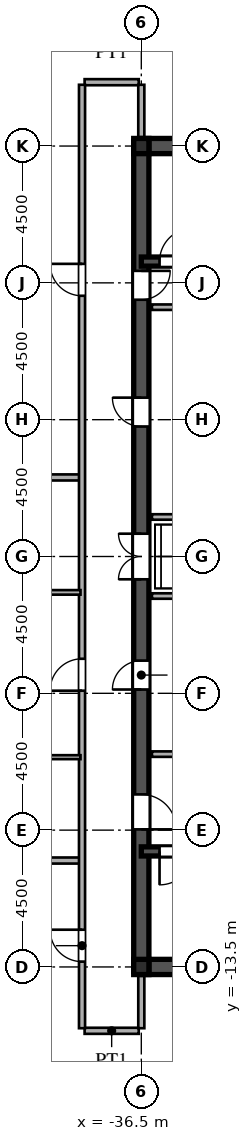
"""IFC4 building model, lengths in metres.
Left out: names, types, materials, properties, quantities, classifications, styles, units other than length and angle.
Written with IfcOpenShell. Run it as: python <this file> out.ifc"""

import sys

from ifc_helpers import new_model, si_unit, direction, frame, frame_2d, origin, origin_2d, place, context, subcontext, project, spatial, rectangle, i_section, extrude, source, transform, mapped, element, fill, save


model = new_model("IFC4")
c1 = context("Model", 3, precision=1e-05, world=origin(), true_north=direction((0.0, 1.0)))
c2 = subcontext(c1, "Body", "Model", "MODEL_VIEW")
j1 = project(units=[si_unit("LENGTHUNIT", "METRE"), si_unit("PLANEANGLEUNIT", "RADIAN")], contexts=[c1])
p1 = place(None, origin())
s1 = spatial("IfcSite", under=j1, at=p1, CompositionType="ELEMENT")
p2 = place(p1, origin())
s2 = spatial("IfcBuilding", under=s1, at=p2, CompositionType="ELEMENT")
p3 = place(p2, frame((0.0, 0.0, 234.6)))
s3 = spatial("IfcBuildingStorey", under=s2, at=p3, CompositionType="ELEMENT", Elevation=234.6)
m1 = source(origin(), c2, "Body", "SweptSolid", [
    extrude(i_section(OverallWidth=0.5, OverallDepth=0.5, WebThickness=0.02, FlangeThickness=0.032, at=origin_2d()), origin(), (0.0, 0.0, 1.0), 4.8),
])
for number, where, z_axis, x_axis in (
    (1, (-36.5, -13.5, 0.0), (0.0, 0.0, 1.0), (1.0, 0.0, 0.0)),
    (2, (-36.5, 13.5, 0.0), (0.0, 0.0, 1.0), (1.0, 0.0, 0.0)),
):
    element("IfcColumn", number, at=place(p3, frame(where, z_axis=z_axis, x_axis=x_axis)), inside=s3, PredefinedType="COLUMN", context=c2, shape_type="MappedRepresentation", body=[
        mapped(m1, transform((0.0, 0.0, 0.0), scale=1.0)),
    ])
for number, where, z_axis, x_axis in (
    (3, (-36.5, -13.5, 0.0), (0.0, 0.0, 1.0), (1.0, 0.0, 0.0)),
    (4, (-36.5, 13.5, 0.0), (0.0, 0.0, 1.0), (1.0, 0.0, 0.0)),
):
    element("IfcWall", number, at=place(p3, frame(where, z_axis=z_axis, x_axis=x_axis)), inside=s3, PredefinedType="SHEAR", context=c2, shape_type="SweptSolid", body=[
        extrude(rectangle(XDim=9.0, YDim=0.5, at=frame_2d((4.5, 0.0))), origin(), (0.0, 0.0, 1.0), 4.58),
    ])
p4 = place(p3, frame((-36.5, -13.65, 0.0), z_axis=(0.0, 0.0, 1.0), x_axis=(0.0, 1.0, 0.0)))
e5 = element("IfcWall", 5, at=p4, inside=s3, PredefinedType="SHEAR", context=c2, shape_type="SweptSolid", body=[
    extrude(rectangle(XDim=7.15, YDim=0.5, at=frame_2d((3.575, 0.0))), origin(), (0.0, 0.0, 1.0), 4.58),
])
p5 = place(p4, frame((4.675, 0.0, 0.0)))
e6 = element("IfcOpeningElement", 6, at=p5, cuts=e5, PredefinedType="OPENING", context=c2, shape_type="SweptSolid", body=[
    extrude(rectangle(XDim=1.15, YDim=2.2, at=frame_2d((0.575, 1.1))), frame((0.0, 0.26, 0.0), z_axis=(0.0, -1.0, 0.0), x_axis=(1.0, 0.0, 0.0)), (0.0, 0.0, 1.0), 0.52),
])
p6 = place(p3, frame((-36.5, -1.3, 0.0), z_axis=(0.0, 0.0, 1.0), x_axis=(0.0, 1.0, 0.0)))
e7 = element("IfcWall", 7, at=p6, inside=s3, PredefinedType="SHEAR", context=c2, shape_type="SweptSolid", body=[
    extrude(rectangle(XDim=2.6, YDim=0.5, at=frame_2d((1.3, 0.0))), origin(), (0.0, 0.0, 1.0), 4.58),
])
p7 = place(p6, frame((0.55, 0.0, 0.0)))
e8 = element("IfcOpeningElement", 8, at=p7, cuts=e7, PredefinedType="OPENING", context=c2, shape_type="SweptSolid", body=[
    extrude(rectangle(XDim=1.5, YDim=2.3, at=frame_2d((0.75, 1.15))), frame((0.0, 0.26, 0.0), z_axis=(0.0, -1.0, 0.0), x_axis=(1.0, 0.0, 0.0)), (0.0, 0.0, 1.0), 0.52),
])
p8 = place(p3, frame((-36.5, 8.2, 0.0), z_axis=(0.0, 0.0, 1.0), x_axis=(0.0, 1.0, 0.0)))
e9 = element("IfcWall", 9, at=p8, inside=s3, PredefinedType="SHEAR", context=c2, shape_type="SweptSolid", body=[
    extrude(rectangle(XDim=5.45, YDim=0.5, at=frame_2d((2.725, 0.0))), origin(), (0.0, 0.0, 1.0), 4.58),
])
p9 = place(p8, frame((0.245, 0.0, 0.0)))
e10 = element("IfcOpeningElement", 10, at=p9, cuts=e9, PredefinedType="OPENING", context=c2, shape_type="SweptSolid", body=[
    extrude(rectangle(XDim=0.95, YDim=2.15, at=frame_2d((0.475, 1.075))), frame((0.0, 0.26, 0.0), z_axis=(0.0, -1.0, 0.0), x_axis=(1.0, 0.0, 0.0)), (0.0, 0.0, 1.0), 0.52),
])
p10 = place(p3, frame((-36.5, -6.5, 0.0), z_axis=(0.0, 0.0, 1.0), x_axis=(0.0, 1.0, 0.0)))
e11 = element("IfcWall", 11, at=p10, inside=s3, PredefinedType="SHEAR", context=c2, shape_type="SweptSolid", body=[
    extrude(rectangle(XDim=5.2, YDim=0.5, at=frame_2d((2.6, 0.0))), origin(), (0.0, 0.0, 1.0), 4.58),
])
p11 = place(p10, frame((2.125, 0.0, 0.0)))
e12 = element("IfcOpeningElement", 12, at=p11, cuts=e11, PredefinedType="OPENING", context=c2, shape_type="SweptSolid", body=[
    extrude(rectangle(XDim=0.95, YDim=2.15, at=frame_2d((0.475, 1.075))), frame((0.0, 0.26, 0.0), z_axis=(0.0, -1.0, 0.0), x_axis=(1.0, 0.0, 0.0)), (0.0, 0.0, 1.0), 0.52),
])
p12 = place(p3, frame((-36.5, 1.3, 0.0), z_axis=(0.0, 0.0, 1.0), x_axis=(0.0, 1.0, 0.0)))
e13 = element("IfcWall", 13, at=p12, inside=s3, PredefinedType="SHEAR", context=c2, shape_type="SweptSolid", body=[
    extrude(rectangle(XDim=6.9, YDim=0.5, at=frame_2d((3.45, 0.0))), origin(), (0.0, 0.0, 1.0), 4.58),
])
p13 = place(p12, frame((2.975, 0.0, 0.0)))
e14 = element("IfcOpeningElement", 14, at=p13, cuts=e13, PredefinedType="OPENING", context=c2, shape_type="SweptSolid", body=[
    extrude(rectangle(XDim=0.95, YDim=2.15, at=frame_2d((0.475, 1.075))), frame((0.0, 0.26, 0.0), z_axis=(0.0, -1.0, 0.0), x_axis=(1.0, 0.0, 0.0)), (0.0, 0.0, 1.0), 0.52),
])
p14 = place(p3, frame((-36.5, -9.7, 0.0), z_axis=(0.0, 0.0, 1.0), x_axis=(1.0, 0.0, 0.0)))
e15 = element("IfcWall", 15, at=p14, inside=s3, PredefinedType="SHEAR", context=c2, shape_type="SweptSolid", body=[
    extrude(rectangle(XDim=9.0, YDim=0.3, at=frame_2d((4.5, 0.0))), origin(), (0.0, 0.0, 1.0), 4.58),
])
p15 = place(p14, frame((0.6, 0.0, 0.0)))
e16 = element("IfcOpeningElement", 16, at=p15, cuts=e15, PredefinedType="OPENING", context=c2, shape_type="SweptSolid", body=[
    extrude(rectangle(XDim=1.1, YDim=2.2, at=frame_2d((0.55, 1.1))), frame((0.0, 0.16, 0.0), z_axis=(0.0, -1.0, 0.0), x_axis=(1.0, 0.0, 0.0)), (0.0, 0.0, 1.0), 0.32),
])
p16 = place(p3, frame((-36.5, 9.7, 0.0), z_axis=(0.0, 0.0, 1.0), x_axis=(1.0, 0.0, 0.0)))
e17 = element("IfcWall", 17, at=p16, inside=s3, PredefinedType="SHEAR", context=c2, shape_type="SweptSolid", body=[
    extrude(rectangle(XDim=9.0, YDim=0.3, at=frame_2d((4.5, 0.0))), origin(), (0.0, 0.0, 1.0), 4.58),
])
p17 = place(p16, frame((0.6, 0.0, 0.0)))
e18 = element("IfcOpeningElement", 18, at=p17, cuts=e17, PredefinedType="OPENING", context=c2, shape_type="SweptSolid", body=[
    extrude(rectangle(XDim=1.1, YDim=2.2, at=frame_2d((0.55, 1.1))), frame((0.0, 0.16, 0.0), z_axis=(0.0, -1.0, 0.0), x_axis=(1.0, 0.0, 0.0)), (0.0, 0.0, 1.0), 0.32),
])
for number, where, z_axis, x_axis in (
    (19, (-36.15, -6.5, 0.0), (0.0, 0.0, 1.0), (1.0, 0.0, 0.0)),
    (20, (-36.15, 8.2, 0.0), (0.0, 0.0, 1.0), (1.0, 0.0, 0.0)),
):
    element("IfcWall", number, at=place(p3, frame(where, z_axis=z_axis, x_axis=x_axis)), inside=s3, PredefinedType="PARTITIONING", context=c2, shape_type="SweptSolid", body=[
        extrude(rectangle(XDim=5.7, YDim=0.18, at=frame_2d((2.85, 0.0))), origin(), (0.0, 0.0, 1.0), 4.58),
    ])
for number, where, z_axis, x_axis in (
    (21, (-36.15, -1.3, 0.0), (0.0, 0.0, 1.0), (1.0, 0.0, 0.0)),
    (22, (-36.15, 1.3, 0.0), (0.0, 0.0, 1.0), (1.0, 0.0, 0.0)),
):
    element("IfcWall", number, at=place(p3, frame(where, z_axis=z_axis, x_axis=x_axis)), inside=s3, PredefinedType="PARTITIONING", context=c2, shape_type="SweptSolid", body=[
        extrude(rectangle(XDim=2.95, YDim=0.18, at=frame_2d((1.475, 0.0))), origin(), (0.0, 0.0, 1.0), 4.58),
    ])
p18 = place(p3, frame((-38.365, -15.6, 0.0), z_axis=(0.0, 0.0, 1.0), x_axis=(1.0, 0.0, 0.0)))
e23 = element("IfcWall", 23, at=p18, inside=s3, PredefinedType="PARTITIONING", context=c2, shape_type="SweptSolid", body=[
    extrude(rectangle(XDim=1.78, YDim=0.2, at=frame_2d((0.89, 0.0))), origin(), (0.0, 0.0, 1.0), 4.58),
])
p19 = place(p3, frame((-53.343, -10.0, 0.0), z_axis=(0.0, 0.0, 1.0), x_axis=(1.0, 0.0, 0.0)))
e24 = element("IfcWall", 24, at=p19, inside=s3, PredefinedType="PARTITIONING", context=c2, shape_type="SweptSolid", body=[
    extrude(rectangle(XDim=14.813, YDim=0.2, at=frame_2d((7.406, 0.0))), origin(), (0.0, 0.0, 1.0), 4.58),
])
p20 = place(p3, frame((-42.25, -6.6, 0.0), z_axis=(0.0, 0.0, 1.0), x_axis=(1.0, 0.0, 0.0)))
e25 = element("IfcWall", 25, at=p20, inside=s3, PredefinedType="PARTITIONING", context=c2, shape_type="SweptSolid", body=[
    extrude(rectangle(XDim=3.75, YDim=0.13, at=frame_2d((1.875, 0.0))), origin(), (0.0, 0.0, 1.0), 4.58),
])
p21 = place(p20, frame((1.435, 0.0, 0.0)))
e26 = element("IfcOpeningElement", 26, at=p21, cuts=e25, PredefinedType="OPENING", context=c2, shape_type="SweptSolid", body=[
    extrude(rectangle(XDim=0.88, YDim=2.1, at=frame_2d((0.44, 1.05))), frame((0.0, 0.075, 0.0), z_axis=(0.0, -1.0, 0.0), x_axis=(1.0, 0.0, 0.0)), (0.0, 0.0, 1.0), 0.15),
])
p22 = place(p3, frame((-42.25, -1.18, 0.0), z_axis=(0.0, 0.0, 1.0), x_axis=(1.0, 0.0, 0.0)))
e27 = element("IfcWall", 27, at=p22, inside=s3, PredefinedType="PARTITIONING", context=c2, shape_type="SweptSolid", body=[
    extrude(rectangle(XDim=3.75, YDim=0.15, at=frame_2d((1.875, 0.0))), origin(), (0.0, 0.0, 1.0), 4.58),
])
p23 = place(p22, frame((1.4, 0.0, 0.0)))
e28 = element("IfcOpeningElement", 28, at=p23, cuts=e27, PredefinedType="OPENING", context=c2, shape_type="SweptSolid", body=[
    extrude(rectangle(XDim=0.95, YDim=2.15, at=frame_2d((0.475, 1.075))), frame((0.0, 0.085, 0.0), z_axis=(0.0, -1.0, 0.0), x_axis=(1.0, 0.0, 0.0)), (0.0, 0.0, 1.0), 0.17),
])
p24 = place(p3, frame((-65.676, 2.6, 0.0), z_axis=(0.0, 0.0, 1.0), x_axis=(1.0, 0.0, 0.0)))
e29 = element("IfcWall", 29, at=p24, inside=s3, PredefinedType="PARTITIONING", context=c2, shape_type="SweptSolid", body=[
    extrude(rectangle(XDim=27.146, YDim=0.2, at=frame_2d((13.573, 0.0))), origin(), (0.0, 0.0, 1.0), 4.58),
])
p25 = place(p3, frame((-38.365, 15.6, 0.0), z_axis=(0.0, 0.0, 1.0), x_axis=(1.0, 0.0, 0.0)))
e30 = element("IfcWall", 30, at=p25, inside=s3, PredefinedType="PARTITIONING", context=c2, shape_type="SweptSolid", body=[
    extrude(rectangle(XDim=1.78, YDim=0.2, at=frame_2d((0.89, 0.0))), origin(), (0.0, 0.0, 1.0), 4.58),
])
p26 = place(p3, frame((-38.45, -15.515, 0.0), z_axis=(0.0, 0.0, 1.0), x_axis=(0.0, 1.0, 0.0)))
e31 = element("IfcWall", 31, at=p26, inside=s3, PredefinedType="PARTITIONING", context=c2, shape_type="SweptSolid", body=[
    extrude(rectangle(XDim=31.03, YDim=0.2, at=frame_2d((15.515, 0.0))), origin(), (0.0, 0.0, 1.0), 4.58),
])
p27 = place(p26, frame((2.19, 0.0, 0.0)))
e32 = element("IfcOpeningElement", 32, at=p27, cuts=e31, PredefinedType="OPENING", context=c2, shape_type="SweptSolid", body=[
    extrude(rectangle(XDim=1.05, YDim=2.25, at=frame_2d((0.525, 1.125))), frame((0.0, 0.11, 0.0), z_axis=(0.0, -1.0, 0.0), x_axis=(1.0, 0.0, 0.0)), (0.0, 0.0, 1.0), 0.22),
])
p28 = place(p26, frame((11.101, 0.0, 0.0)))
e33 = element("IfcOpeningElement", 33, at=p28, cuts=e31, PredefinedType="OPENING", context=c2, shape_type="SweptSolid", body=[
    extrude(rectangle(XDim=1.05, YDim=2.25, at=frame_2d((0.525, 1.125))), frame((0.0, 0.11, 0.0), z_axis=(0.0, -1.0, 0.0), x_axis=(1.0, 0.0, 0.0)), (0.0, 0.0, 1.0), 0.22),
])
p29 = place(p26, frame((24.09, 0.0, 0.0)))
e34 = element("IfcOpeningElement", 34, at=p29, cuts=e31, PredefinedType="OPENING", context=c2, shape_type="SweptSolid", body=[
    extrude(rectangle(XDim=1.05, YDim=2.25, at=frame_2d((0.525, 1.125))), frame((0.0, 0.11, 0.0), z_axis=(0.0, -1.0, 0.0), x_axis=(1.0, 0.0, 0.0)), (0.0, 0.0, 1.0), 0.22),
])
for number, where, z_axis, x_axis in (
    (35, (-36.5, -15.515, 0.0), (0.0, 0.0, 1.0), (0.0, 1.0, 0.0)),
    (36, (-36.5, 13.755, 0.0), (0.0, 0.0, 1.0), (0.0, 1.0, 0.0)),
):
    element("IfcWall", number, at=place(p3, frame(where, z_axis=z_axis, x_axis=x_axis)), inside=s3, PredefinedType="PARTITIONING", context=c2, shape_type="SweptSolid", body=[
        extrude(rectangle(XDim=1.76, YDim=0.2, at=frame_2d((0.88, 0.0))), origin(), (0.0, 0.0, 1.0), 3.98),
    ])
m2 = source(origin(), c2, "Body", "SweptSolid", [
    extrude(rectangle(XDim=1.15, YDim=2.2, at=frame_2d((0.575, 1.1))), frame((0.0, 0.025, 0.0), z_axis=(0.0, -1.0, 0.0), x_axis=(1.0, 0.0, 0.0)), (0.0, 0.0, 1.0), 0.05),
])
p30 = place(p5, frame((1.15, 0.0, 0.0), z_axis=(0.0, 0.0, 1.0), x_axis=(-1.0, 0.0, 0.0)))
e37 = element("IfcDoor", 37, at=p30, inside=s3, OperationType="SINGLE_SWING_LEFT", PredefinedType="DOOR", context=c2, shape_type="MappedRepresentation", body=[
    mapped(m2, transform((0.0, 0.0, 0.0), scale=1.0)),
])
fill(e6, e37)
m3 = source(origin(), c2, "Body", "SweptSolid", [
    extrude(rectangle(XDim=1.5, YDim=2.3, at=frame_2d((0.75, 1.15))), frame((0.0, 0.025, 0.0), z_axis=(0.0, -1.0, 0.0), x_axis=(1.0, 0.0, 0.0)), (0.0, 0.0, 1.0), 0.05),
])
p31 = place(p7, origin())
e38 = element("IfcDoor", 38, at=p31, inside=s3, OperationType="DOUBLE_SWING_LEFT", PredefinedType="DOOR", context=c2, shape_type="MappedRepresentation", body=[
    mapped(m3, transform((0.0, 0.0, 0.0), scale=1.0)),
])
fill(e8, e38)
m4 = source(origin(), c2, "Body", "SweptSolid", [
    extrude(rectangle(XDim=0.95, YDim=2.15, at=frame_2d((0.475, 1.075))), frame((0.0, 0.025, 0.0), z_axis=(0.0, -1.0, 0.0), x_axis=(1.0, 0.0, 0.0)), (0.0, 0.0, 1.0), 0.05),
])
p32 = place(p9, frame((0.95, 0.0, 0.0), z_axis=(0.0, 0.0, 1.0), x_axis=(-1.0, 0.0, 0.0)))
e39 = element("IfcDoor", 39, at=p32, inside=s3, OperationType="SINGLE_SWING_RIGHT", PredefinedType="DOOR", context=c2, shape_type="MappedRepresentation", body=[
    mapped(m4, transform((0.0, 0.0, 0.0), scale=1.0)),
])
fill(e10, e39)
p33 = place(p11, origin())
e40 = element("IfcDoor", 40, at=p33, inside=s3, OperationType="SINGLE_SWING_LEFT", PredefinedType="DOOR", context=c2, shape_type="MappedRepresentation", body=[
    mapped(m4, transform((0.0, 0.0, 0.0), scale=1.0)),
])
fill(e12, e40)
p34 = place(p13, origin())
e41 = element("IfcDoor", 41, at=p34, inside=s3, OperationType="SINGLE_SWING_RIGHT", PredefinedType="DOOR", context=c2, shape_type="MappedRepresentation", body=[
    mapped(m4, transform((0.0, 0.0, 0.0), scale=1.0)),
])
fill(e14, e41)
m5 = source(origin(), c2, "Body", "SweptSolid", [
    extrude(rectangle(XDim=1.1, YDim=2.2, at=frame_2d((0.55, 1.1))), frame((0.0, 0.025, 0.0), z_axis=(0.0, -1.0, 0.0), x_axis=(1.0, 0.0, 0.0)), (0.0, 0.0, 1.0), 0.05),
])
p35 = place(p15, frame((1.1, 0.0, 0.0), z_axis=(0.0, 0.0, 1.0), x_axis=(-1.0, 0.0, 0.0)))
e42 = element("IfcDoor", 42, at=p35, inside=s3, OperationType="SINGLE_SWING_LEFT", PredefinedType="DOOR", context=c2, shape_type="MappedRepresentation", body=[
    mapped(m5, transform((0.0, 0.0, 0.0), scale=1.0)),
])
fill(e16, e42)
p36 = place(p17, origin())
e43 = element("IfcDoor", 43, at=p36, inside=s3, OperationType="SINGLE_SWING_RIGHT", PredefinedType="DOOR", context=c2, shape_type="MappedRepresentation", body=[
    mapped(m5, transform((0.0, 0.0, 0.0), scale=1.0)),
])
fill(e18, e43)
m6 = source(origin(), c2, "Body", "SweptSolid", [
    extrude(rectangle(XDim=1.05, YDim=2.25, at=frame_2d((0.525, 1.125))), frame((0.0, 0.025, 0.0), z_axis=(0.0, -1.0, 0.0), x_axis=(1.0, 0.0, 0.0)), (0.0, 0.0, 1.0), 0.05),
])
p37 = place(p27, origin())
e44 = element("IfcDoor", 44, at=p37, inside=s3, OperationType="SINGLE_SWING_RIGHT", PredefinedType="DOOR", context=c2, shape_type="MappedRepresentation", body=[
    mapped(m6, transform((0.0, 0.0, 0.0), scale=1.0)),
])
fill(e32, e44)
p38 = place(p28, origin())
e45 = element("IfcDoor", 45, at=p38, inside=s3, OperationType="SINGLE_SWING_LEFT", PredefinedType="DOOR", context=c2, shape_type="MappedRepresentation", body=[
    mapped(m6, transform((0.0, 0.0, 0.0), scale=1.0)),
])
fill(e33, e45)
p39 = place(p29, origin())
e46 = element("IfcDoor", 46, at=p39, inside=s3, OperationType="SINGLE_SWING_RIGHT", PredefinedType="DOOR", context=c2, shape_type="MappedRepresentation", body=[
    mapped(m6, transform((0.0, 0.0, 0.0), scale=1.0)),
])
fill(e34, e46)
save(model, sys.argv[1])
